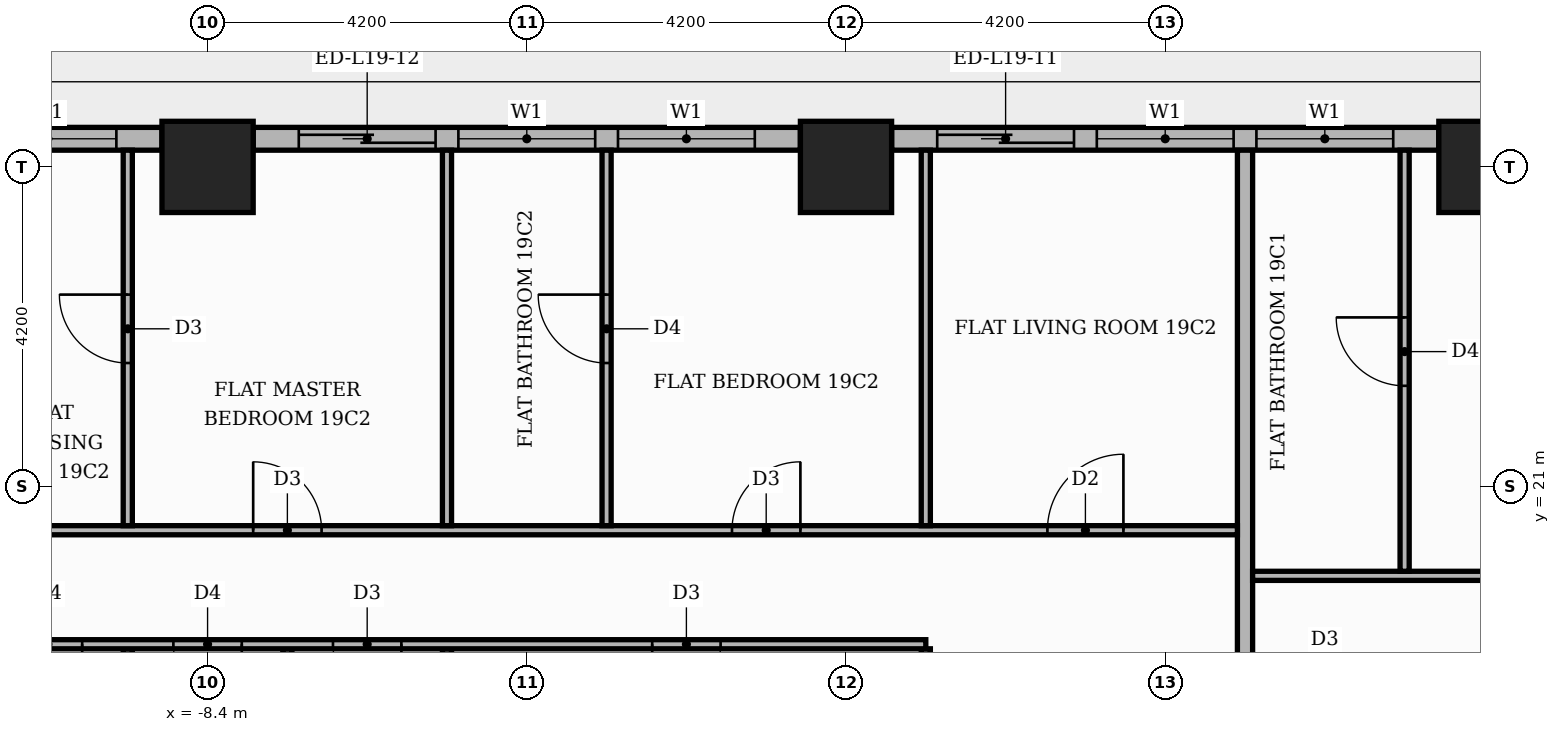
"""IFC4 building model, lengths in metres.
Left out: names, types, materials, properties, quantities, classifications, styles, units other than length and angle.
Written with IfcOpenShell. Run it as: python <this file> out.ifc"""

import sys

from ifc_helpers import new_model, si_unit, direction, frame, frame_2d, origin, origin_2d, place, context, subcontext, project, spatial, rectangle, extrude, element, fill, save


model = new_model("IFC4")
c1 = context("Model", 3, precision=1e-05, world=origin(), true_north=direction((0.0, 1.0)))
c2 = subcontext(c1, "Body", "Model", "MODEL_VIEW")
j1 = project(units=[si_unit("LENGTHUNIT", "METRE"), si_unit("PLANEANGLEUNIT", "RADIAN")], contexts=[c1])
p1 = place(None, origin())
s1 = spatial("IfcSite", under=j1, at=p1, CompositionType="ELEMENT")
p2 = place(p1, origin())
s2 = spatial("IfcBuilding", under=s1, at=p2, CompositionType="ELEMENT")
p3 = place(p2, frame((0.0, 0.0, 83.1)))
s3 = spatial("IfcBuildingStorey", under=s2, at=p3, CompositionType="ELEMENT", Elevation=83.1)
for number, where, z_axis, x_axis in (
    (1, (0.0, 25.2, 0.0), (0.0, 0.0, 1.0), (1.0, 0.0, 0.0)),
    (2, (-8.4, 25.2, 0.0), (0.0, 0.0, 1.0), (1.0, 0.0, 0.0)),
    (3, (8.4, 25.2, 0.0), (0.0, 0.0, 1.0), (1.0, 0.0, 0.0)),
):
    element("IfcColumn", number, at=place(p3, frame(where, z_axis=z_axis, x_axis=x_axis)), inside=s3, PredefinedType="COLUMN", context=c2, shape_type="SweptSolid", body=[
        extrude(rectangle(XDim=1.2, YDim=1.2, at=origin_2d()), origin(), (0.0, 0.0, 1.0), 3.9),
    ])
p4 = place(p3, frame((7.8, 25.57, 0.0), z_axis=(0.0, 0.0, 1.0), x_axis=(-1.0, 0.0, 0.0)))
e4 = element("IfcWall", 4, at=p4, inside=s3, PredefinedType="STANDARD", context=c2, shape_type="SweptSolid", body=[
    extrude(rectangle(XDim=7.2, YDim=0.3, at=frame_2d((3.6, 0.0))), origin(), (0.0, 0.0, 1.0), 3.48),
])
p5 = place(p4, frame((0.6, 0.0, 0.9)))
e5 = element("IfcOpeningElement", 5, at=p5, cuts=e4, PredefinedType="OPENING", context=c2, shape_type="SweptSolid", body=[
    extrude(rectangle(XDim=1.8, YDim=2.1, at=frame_2d((0.9, 1.05))), frame((0.0, 0.16, 0.0), z_axis=(0.0, -1.0, 0.0), x_axis=(1.0, 0.0, 0.0)), (0.0, 0.0, 1.0), 0.32),
])
p6 = place(p4, frame((2.7, 0.0, 0.9)))
e6 = element("IfcOpeningElement", 6, at=p6, cuts=e4, PredefinedType="OPENING", context=c2, shape_type="SweptSolid", body=[
    extrude(rectangle(XDim=1.8, YDim=2.1, at=frame_2d((0.9, 1.05))), frame((0.0, 0.16, 0.0), z_axis=(0.0, -1.0, 0.0), x_axis=(1.0, 0.0, 0.0)), (0.0, 0.0, 1.0), 0.32),
])
p7 = place(p4, frame((4.8, 0.0, 0.0)))
e7 = element("IfcOpeningElement", 7, at=p7, cuts=e4, PredefinedType="OPENING", context=c2, shape_type="SweptSolid", body=[
    extrude(rectangle(XDim=1.8, YDim=2.4, at=frame_2d((0.9, 1.2))), frame((0.0, 0.16, 0.0), z_axis=(0.0, -1.0, 0.0), x_axis=(1.0, 0.0, 0.0)), (0.0, 0.0, 1.0), 0.32),
])
p8 = place(p3, frame((-0.6, 25.57, 0.0), z_axis=(0.0, 0.0, 1.0), x_axis=(-1.0, 0.0, 0.0)))
e8 = element("IfcWall", 8, at=p8, inside=s3, PredefinedType="STANDARD", context=c2, shape_type="SweptSolid", body=[
    extrude(rectangle(XDim=7.2, YDim=0.3, at=frame_2d((3.6, 0.0))), origin(), (0.0, 0.0, 1.0), 3.48),
])
p9 = place(p8, frame((0.6, 0.0, 0.9)))
e9 = element("IfcOpeningElement", 9, at=p9, cuts=e8, PredefinedType="OPENING", context=c2, shape_type="SweptSolid", body=[
    extrude(rectangle(XDim=1.8, YDim=2.1, at=frame_2d((0.9, 1.05))), frame((0.0, 0.16, 0.0), z_axis=(0.0, -1.0, 0.0), x_axis=(1.0, 0.0, 0.0)), (0.0, 0.0, 1.0), 0.32),
])
p10 = place(p8, frame((2.7, 0.0, 0.9)))
e10 = element("IfcOpeningElement", 10, at=p10, cuts=e8, PredefinedType="OPENING", context=c2, shape_type="SweptSolid", body=[
    extrude(rectangle(XDim=1.8, YDim=2.1, at=frame_2d((0.9, 1.05))), frame((0.0, 0.16, 0.0), z_axis=(0.0, -1.0, 0.0), x_axis=(1.0, 0.0, 0.0)), (0.0, 0.0, 1.0), 0.32),
])
p11 = place(p8, frame((4.8, 0.0, 0.0)))
e11 = element("IfcOpeningElement", 11, at=p11, cuts=e8, PredefinedType="OPENING", context=c2, shape_type="SweptSolid", body=[
    extrude(rectangle(XDim=1.8, YDim=2.4, at=frame_2d((0.9, 1.2))), frame((0.0, 0.16, 0.0), z_axis=(0.0, -1.0, 0.0), x_axis=(1.0, 0.0, 0.0)), (0.0, 0.0, 1.0), 0.32),
])
p12 = place(p3, frame((-9.0, 25.57, 0.0), z_axis=(0.0, 0.0, 1.0), x_axis=(-1.0, 0.0, 0.0)))
e12 = element("IfcWall", 12, at=p12, inside=s3, PredefinedType="STANDARD", context=c2, shape_type="SweptSolid", body=[
    extrude(rectangle(XDim=7.2, YDim=0.3, at=frame_2d((3.6, 0.0))), origin(), (0.0, 0.0, 1.0), 3.48),
])
p13 = place(p12, frame((0.6, 0.0, 0.9)))
e13 = element("IfcOpeningElement", 13, at=p13, cuts=e12, PredefinedType="OPENING", context=c2, shape_type="SweptSolid", body=[
    extrude(rectangle(XDim=1.8, YDim=2.1, at=frame_2d((0.9, 1.05))), frame((0.0, 0.16, 0.0), z_axis=(0.0, -1.0, 0.0), x_axis=(1.0, 0.0, 0.0)), (0.0, 0.0, 1.0), 0.32),
])
p14 = place(p12, frame((2.7, 0.0, 0.9)))
e14 = element("IfcOpeningElement", 14, at=p14, cuts=e12, PredefinedType="OPENING", context=c2, shape_type="SweptSolid", body=[
    extrude(rectangle(XDim=1.8, YDim=2.1, at=frame_2d((0.9, 1.05))), frame((0.0, 0.16, 0.0), z_axis=(0.0, -1.0, 0.0), x_axis=(1.0, 0.0, 0.0)), (0.0, 0.0, 1.0), 0.32),
])
p15 = place(p12, frame((4.8, 0.0, 0.9)))
e15 = element("IfcOpeningElement", 15, at=p15, cuts=e12, PredefinedType="OPENING", context=c2, shape_type="SweptSolid", body=[
    extrude(rectangle(XDim=1.8, YDim=2.1, at=frame_2d((0.9, 1.05))), frame((0.0, 0.16, 0.0), z_axis=(0.0, -1.0, 0.0), x_axis=(1.0, 0.0, 0.0)), (0.0, 0.0, 1.0), 0.32),
])
for number, where, z_axis, x_axis in (
    (16, (-9.45, 13.75, 0.0), (0.0, 0.0, 1.0), (0.0, 1.0, 0.0)),
    (17, (-7.35, 13.75, 0.0), (0.0, 0.0, 1.0), (0.0, 1.0, 0.0)),
    (18, (-5.25, 13.75, 0.0), (0.0, 0.0, 1.0), (0.0, 1.0, 0.0)),
    (19, (1.05, 13.75, 0.0), (0.0, 0.0, 1.0), (0.0, 1.0, 0.0)),
):
    element("IfcWall", number, at=place(p3, frame(where, z_axis=z_axis, x_axis=x_axis)), inside=s3, PredefinedType="PARTITIONING", context=c2, shape_type="SweptSolid", body=[
        extrude(rectangle(XDim=5.11, YDim=0.12, at=frame_2d((2.555, 0.0))), origin(), (0.0, 0.0, 1.0), 3.48),
    ])
p16 = place(p3, frame((5.25, 13.75, 0.0), z_axis=(0.0, 0.0, 1.0), x_axis=(0.0, 1.0, 0.0)))
e20 = element("IfcWall", 20, at=p16, inside=s3, PredefinedType="PARTITIONING", context=c2, shape_type="SweptSolid", body=[
    extrude(rectangle(XDim=11.67, YDim=0.2, at=frame_2d((5.835, 0.0))), origin(), (0.0, 0.0, 1.0), 3.48),
])
p17 = place(p3, frame((-13.55, 18.92, 0.0), z_axis=(0.0, 0.0, 1.0), x_axis=(1.0, 0.0, 0.0)))
e21 = element("IfcWall", 21, at=p17, inside=s3, PredefinedType="PARTITIONING", context=c2, shape_type="SweptSolid", body=[
    extrude(rectangle(XDim=14.6, YDim=0.12, at=frame_2d((7.3, 0.0))), origin(), (0.0, 0.0, 1.0), 3.48),
])
p18 = place(p17, frame((11.0, 0.0, 0.0)))
e22 = element("IfcOpeningElement", 22, at=p18, cuts=e21, PredefinedType="OPENING", context=c2, shape_type="SweptSolid", body=[
    extrude(rectangle(XDim=0.9, YDim=2.1, at=frame_2d((0.45, 1.05))), frame((0.0, 0.07, 0.0), z_axis=(0.0, -1.0, 0.0), x_axis=(1.0, 0.0, 0.0)), (0.0, 0.0, 1.0), 0.14),
])
p19 = place(p17, frame((6.8, 0.0, 0.0)))
e23 = element("IfcOpeningElement", 23, at=p19, cuts=e21, PredefinedType="OPENING", context=c2, shape_type="SweptSolid", body=[
    extrude(rectangle(XDim=0.9, YDim=2.1, at=frame_2d((0.45, 1.05))), frame((0.0, 0.07, 0.0), z_axis=(0.0, -1.0, 0.0), x_axis=(1.0, 0.0, 0.0)), (0.0, 0.0, 1.0), 0.14),
])
p20 = place(p17, frame((4.7, 0.0, 0.0)))
e24 = element("IfcOpeningElement", 24, at=p20, cuts=e21, PredefinedType="OPENING", context=c2, shape_type="SweptSolid", body=[
    extrude(rectangle(XDim=0.9, YDim=2.1, at=frame_2d((0.45, 1.05))), frame((0.0, 0.07, 0.0), z_axis=(0.0, -1.0, 0.0), x_axis=(1.0, 0.0, 0.0)), (0.0, 0.0, 1.0), 0.14),
])
p21 = place(p17, frame((2.6, 0.0, 0.0)))
e25 = element("IfcOpeningElement", 25, at=p21, cuts=e21, PredefinedType="OPENING", context=c2, shape_type="SweptSolid", body=[
    extrude(rectangle(XDim=0.9, YDim=2.1, at=frame_2d((0.45, 1.05))), frame((0.0, 0.07, 0.0), z_axis=(0.0, -1.0, 0.0), x_axis=(1.0, 0.0, 0.0)), (0.0, 0.0, 1.0), 0.14),
])
p22 = place(p17, frame((0.5, 0.0, 0.0)))
e26 = element("IfcOpeningElement", 26, at=p22, cuts=e21, PredefinedType="OPENING", context=c2, shape_type="SweptSolid", body=[
    extrude(rectangle(XDim=0.9, YDim=2.1, at=frame_2d((0.45, 1.05))), frame((0.0, 0.07, 0.0), z_axis=(0.0, -1.0, 0.0), x_axis=(1.0, 0.0, 0.0)), (0.0, 0.0, 1.0), 0.14),
])
p23 = place(p3, frame((5.35, 19.82, 0.0), z_axis=(0.0, 0.0, 1.0), x_axis=(1.0, 0.0, 0.0)))
e27 = element("IfcWall", 27, at=p23, inside=s3, PredefinedType="PARTITIONING", context=c2, shape_type="SweptSolid", body=[
    extrude(rectangle(XDim=12.05, YDim=0.12, at=frame_2d((6.025, 0.0))), origin(), (0.0, 0.0, 1.0), 3.48),
])
p24 = place(p23, frame((8.85, 0.0, 0.0)))
e28 = element("IfcOpeningElement", 28, at=p24, cuts=e27, PredefinedType="OPENING", context=c2, shape_type="SweptSolid", body=[
    extrude(rectangle(XDim=1.0, YDim=2.1, at=frame_2d((0.5, 1.05))), frame((0.0, 0.07, 0.0), z_axis=(0.0, -1.0, 0.0), x_axis=(1.0, 0.0, 0.0)), (0.0, 0.0, 1.0), 0.14),
])
p25 = place(p23, frame((5.75, 0.0, 0.0)))
e29 = element("IfcOpeningElement", 29, at=p25, cuts=e27, PredefinedType="OPENING", context=c2, shape_type="SweptSolid", body=[
    extrude(rectangle(XDim=0.9, YDim=2.1, at=frame_2d((0.45, 1.05))), frame((0.0, 0.07, 0.0), z_axis=(0.0, -1.0, 0.0), x_axis=(1.0, 0.0, 0.0)), (0.0, 0.0, 1.0), 0.14),
])
p26 = place(p3, frame((7.35, 19.88, 0.0), z_axis=(0.0, 0.0, 1.0), x_axis=(0.0, 1.0, 0.0)))
e30 = element("IfcWall", 30, at=p26, inside=s3, PredefinedType="PARTITIONING", context=c2, shape_type="SweptSolid", body=[
    extrude(rectangle(XDim=5.54, YDim=0.12, at=frame_2d((2.77, 0.0))), origin(), (0.0, 0.0, 1.0), 3.48),
])
p27 = place(p26, frame((2.44, 0.0, 0.0)))
e31 = element("IfcOpeningElement", 31, at=p27, cuts=e30, PredefinedType="OPENING", context=c2, shape_type="SweptSolid", body=[
    extrude(rectangle(XDim=0.9, YDim=2.1, at=frame_2d((0.45, 1.05))), frame((0.0, 0.07, 0.0), z_axis=(0.0, -1.0, 0.0), x_axis=(1.0, 0.0, 0.0)), (0.0, 0.0, 1.0), 0.14),
])
p28 = place(p3, frame((-13.55, 20.42, 0.0), z_axis=(0.0, 0.0, 1.0), x_axis=(1.0, 0.0, 0.0)))
e32 = element("IfcWall", 32, at=p28, inside=s3, PredefinedType="PARTITIONING", context=c2, shape_type="SweptSolid", body=[
    extrude(rectangle(XDim=18.7, YDim=0.12, at=frame_2d((9.35, 0.0))), origin(), (0.0, 0.0, 1.0), 3.48),
])
p29 = place(p28, frame((16.2, 0.0, 0.0)))
e33 = element("IfcOpeningElement", 33, at=p29, cuts=e32, PredefinedType="OPENING", context=c2, shape_type="SweptSolid", body=[
    extrude(rectangle(XDim=1.0, YDim=2.1, at=frame_2d((0.5, 1.05))), frame((0.0, 0.07, 0.0), z_axis=(0.0, -1.0, 0.0), x_axis=(1.0, 0.0, 0.0)), (0.0, 0.0, 1.0), 0.14),
])
p30 = place(p28, frame((12.05, 0.0, 0.0)))
e34 = element("IfcOpeningElement", 34, at=p30, cuts=e32, PredefinedType="OPENING", context=c2, shape_type="SweptSolid", body=[
    extrude(rectangle(XDim=0.9, YDim=2.1, at=frame_2d((0.45, 1.05))), frame((0.0, 0.07, 0.0), z_axis=(0.0, -1.0, 0.0), x_axis=(1.0, 0.0, 0.0)), (0.0, 0.0, 1.0), 0.14),
])
p31 = place(p28, frame((5.75, 0.0, 0.0)))
e35 = element("IfcOpeningElement", 35, at=p31, cuts=e32, PredefinedType="OPENING", context=c2, shape_type="SweptSolid", body=[
    extrude(rectangle(XDim=0.9, YDim=2.1, at=frame_2d((0.45, 1.05))), frame((0.0, 0.07, 0.0), z_axis=(0.0, -1.0, 0.0), x_axis=(1.0, 0.0, 0.0)), (0.0, 0.0, 1.0), 0.14),
])
p32 = place(p3, frame((-9.45, 20.48, 0.0), z_axis=(0.0, 0.0, 1.0), x_axis=(0.0, 1.0, 0.0)))
e36 = element("IfcWall", 36, at=p32, inside=s3, PredefinedType="PARTITIONING", context=c2, shape_type="SweptSolid", body=[
    extrude(rectangle(XDim=4.94, YDim=0.12, at=frame_2d((2.47, 0.0))), origin(), (0.0, 0.0, 1.0), 3.48),
])
p33 = place(p32, frame((2.14, 0.0, 0.0)))
e37 = element("IfcOpeningElement", 37, at=p33, cuts=e36, PredefinedType="OPENING", context=c2, shape_type="SweptSolid", body=[
    extrude(rectangle(XDim=0.9, YDim=2.1, at=frame_2d((0.45, 1.05))), frame((0.0, 0.07, 0.0), z_axis=(0.0, -1.0, 0.0), x_axis=(1.0, 0.0, 0.0)), (0.0, 0.0, 1.0), 0.14),
])
p34 = place(p3, frame((-5.25, 20.48, 0.0), z_axis=(0.0, 0.0, 1.0), x_axis=(0.0, 1.0, 0.0)))
e38 = element("IfcWall", 38, at=p34, inside=s3, PredefinedType="PARTITIONING", context=c2, shape_type="SweptSolid", body=[
    extrude(rectangle(XDim=4.94, YDim=0.12, at=frame_2d((2.47, 0.0))), origin(), (0.0, 0.0, 1.0), 3.48),
])
p35 = place(p3, frame((-3.15, 20.48, 0.0), z_axis=(0.0, 0.0, 1.0), x_axis=(0.0, 1.0, 0.0)))
e39 = element("IfcWall", 39, at=p35, inside=s3, PredefinedType="PARTITIONING", context=c2, shape_type="SweptSolid", body=[
    extrude(rectangle(XDim=4.94, YDim=0.12, at=frame_2d((2.47, 0.0))), origin(), (0.0, 0.0, 1.0), 3.48),
])
p36 = place(p35, frame((2.14, 0.0, 0.0)))
e40 = element("IfcOpeningElement", 40, at=p36, cuts=e39, PredefinedType="OPENING", context=c2, shape_type="SweptSolid", body=[
    extrude(rectangle(XDim=0.9, YDim=2.1, at=frame_2d((0.45, 1.05))), frame((0.0, 0.07, 0.0), z_axis=(0.0, -1.0, 0.0), x_axis=(1.0, 0.0, 0.0)), (0.0, 0.0, 1.0), 0.14),
])
p37 = place(p3, frame((1.05, 20.48, 0.0), z_axis=(0.0, 0.0, 1.0), x_axis=(0.0, 1.0, 0.0)))
e41 = element("IfcWall", 41, at=p37, inside=s3, PredefinedType="PARTITIONING", context=c2, shape_type="SweptSolid", body=[
    extrude(rectangle(XDim=4.94, YDim=0.12, at=frame_2d((2.47, 0.0))), origin(), (0.0, 0.0, 1.0), 3.48),
])
p38 = place(p5, origin())
e42 = element("IfcWindow", 42, at=p38, inside=s3, PartitioningType="SINGLE_PANEL", PredefinedType="WINDOW", context=c2, shape_type="SweptSolid", body=[
    extrude(rectangle(XDim=1.8, YDim=2.1, at=frame_2d((0.9, 1.05))), frame((0.0, 0.03, 0.0), z_axis=(0.0, -1.0, 0.0), x_axis=(1.0, 0.0, 0.0)), (0.0, 0.0, 1.0), 0.06),
])
fill(e5, e42)
p39 = place(p6, origin())
e43 = element("IfcWindow", 43, at=p39, inside=s3, PartitioningType="SINGLE_PANEL", PredefinedType="WINDOW", context=c2, shape_type="SweptSolid", body=[
    extrude(rectangle(XDim=1.8, YDim=2.1, at=frame_2d((0.9, 1.05))), frame((0.0, 0.03, 0.0), z_axis=(0.0, -1.0, 0.0), x_axis=(1.0, 0.0, 0.0)), (0.0, 0.0, 1.0), 0.06),
])
fill(e6, e43)
p40 = place(p7, origin())
e44 = element("IfcDoor", 44, at=p40, inside=s3, OperationType="SLIDING_TO_RIGHT", PredefinedType="DOOR", context=c2, shape_type="SweptSolid", body=[
    extrude(rectangle(XDim=1.8, YDim=2.4, at=frame_2d((0.9, 1.2))), frame((0.0, 0.025, 0.0), z_axis=(0.0, -1.0, 0.0), x_axis=(1.0, 0.0, 0.0)), (0.0, 0.0, 1.0), 0.05),
])
fill(e7, e44)
p41 = place(p9, origin())
e45 = element("IfcWindow", 45, at=p41, inside=s3, PartitioningType="SINGLE_PANEL", PredefinedType="WINDOW", context=c2, shape_type="SweptSolid", body=[
    extrude(rectangle(XDim=1.8, YDim=2.1, at=frame_2d((0.9, 1.05))), frame((0.0, 0.03, 0.0), z_axis=(0.0, -1.0, 0.0), x_axis=(1.0, 0.0, 0.0)), (0.0, 0.0, 1.0), 0.06),
])
fill(e9, e45)
p42 = place(p10, origin())
e46 = element("IfcWindow", 46, at=p42, inside=s3, PartitioningType="SINGLE_PANEL", PredefinedType="WINDOW", context=c2, shape_type="SweptSolid", body=[
    extrude(rectangle(XDim=1.8, YDim=2.1, at=frame_2d((0.9, 1.05))), frame((0.0, 0.03, 0.0), z_axis=(0.0, -1.0, 0.0), x_axis=(1.0, 0.0, 0.0)), (0.0, 0.0, 1.0), 0.06),
])
fill(e10, e46)
p43 = place(p11, origin())
e47 = element("IfcDoor", 47, at=p43, inside=s3, OperationType="SLIDING_TO_RIGHT", PredefinedType="DOOR", context=c2, shape_type="SweptSolid", body=[
    extrude(rectangle(XDim=1.8, YDim=2.4, at=frame_2d((0.9, 1.2))), frame((0.0, 0.025, 0.0), z_axis=(0.0, -1.0, 0.0), x_axis=(1.0, 0.0, 0.0)), (0.0, 0.0, 1.0), 0.05),
])
fill(e11, e47)
p44 = place(p13, origin())
e48 = element("IfcWindow", 48, at=p44, inside=s3, PartitioningType="SINGLE_PANEL", PredefinedType="WINDOW", context=c2, shape_type="SweptSolid", body=[
    extrude(rectangle(XDim=1.8, YDim=2.1, at=frame_2d((0.9, 1.05))), frame((0.0, 0.03, 0.0), z_axis=(0.0, -1.0, 0.0), x_axis=(1.0, 0.0, 0.0)), (0.0, 0.0, 1.0), 0.06),
])
fill(e13, e48)
p45 = place(p27, origin())
e49 = element("IfcDoor", 49, at=p45, inside=s3, OperationType="SINGLE_SWING_RIGHT", PredefinedType="DOOR", context=c2, shape_type="SweptSolid", body=[
    extrude(rectangle(XDim=0.9, YDim=2.1, at=frame_2d((0.45, 1.05))), frame((0.0, 0.025, 0.0), z_axis=(0.0, -1.0, 0.0), x_axis=(1.0, 0.0, 0.0)), (0.0, 0.0, 1.0), 0.05),
])
fill(e31, e49)
p46 = place(p18, frame((0.9, 0.0, 0.0), z_axis=(0.0, 0.0, 1.0), x_axis=(-1.0, 0.0, 0.0)))
e50 = element("IfcDoor", 50, at=p46, inside=s3, OperationType="SINGLE_SWING_LEFT", PredefinedType="DOOR", context=c2, shape_type="SweptSolid", body=[
    extrude(rectangle(XDim=0.9, YDim=2.1, at=frame_2d((0.45, 1.05))), frame((0.0, 0.025, 0.0), z_axis=(0.0, -1.0, 0.0), x_axis=(1.0, 0.0, 0.0)), (0.0, 0.0, 1.0), 0.05),
])
fill(e22, e50)
p47 = place(p19, frame((0.9, 0.0, 0.0), z_axis=(0.0, 0.0, 1.0), x_axis=(-1.0, 0.0, 0.0)))
e51 = element("IfcDoor", 51, at=p47, inside=s3, OperationType="SINGLE_SWING_RIGHT", PredefinedType="DOOR", context=c2, shape_type="SweptSolid", body=[
    extrude(rectangle(XDim=0.9, YDim=2.1, at=frame_2d((0.45, 1.05))), frame((0.0, 0.025, 0.0), z_axis=(0.0, -1.0, 0.0), x_axis=(1.0, 0.0, 0.0)), (0.0, 0.0, 1.0), 0.05),
])
fill(e23, e51)
p48 = place(p20, frame((0.9, 0.0, 0.0), z_axis=(0.0, 0.0, 1.0), x_axis=(-1.0, 0.0, 0.0)))
e52 = element("IfcDoor", 52, at=p48, inside=s3, OperationType="SINGLE_SWING_RIGHT", PredefinedType="DOOR", context=c2, shape_type="SweptSolid", body=[
    extrude(rectangle(XDim=0.9, YDim=2.1, at=frame_2d((0.45, 1.05))), frame((0.0, 0.025, 0.0), z_axis=(0.0, -1.0, 0.0), x_axis=(1.0, 0.0, 0.0)), (0.0, 0.0, 1.0), 0.05),
])
fill(e24, e52)
p49 = place(p21, frame((0.9, 0.0, 0.0), z_axis=(0.0, 0.0, 1.0), x_axis=(-1.0, 0.0, 0.0)))
e53 = element("IfcDoor", 53, at=p49, inside=s3, OperationType="SINGLE_SWING_RIGHT", PredefinedType="DOOR", context=c2, shape_type="SweptSolid", body=[
    extrude(rectangle(XDim=0.9, YDim=2.1, at=frame_2d((0.45, 1.05))), frame((0.0, 0.025, 0.0), z_axis=(0.0, -1.0, 0.0), x_axis=(1.0, 0.0, 0.0)), (0.0, 0.0, 1.0), 0.05),
])
fill(e25, e53)
p50 = place(p29, origin())
e54 = element("IfcDoor", 54, at=p50, inside=s3, OperationType="SINGLE_SWING_RIGHT", PredefinedType="DOOR", context=c2, shape_type="SweptSolid", body=[
    extrude(rectangle(XDim=1.0, YDim=2.1, at=frame_2d((0.5, 1.05))), frame((0.0, 0.025, 0.0), z_axis=(0.0, -1.0, 0.0), x_axis=(1.0, 0.0, 0.0)), (0.0, 0.0, 1.0), 0.05),
])
fill(e33, e54)
p51 = place(p30, origin())
e55 = element("IfcDoor", 55, at=p51, inside=s3, OperationType="SINGLE_SWING_RIGHT", PredefinedType="DOOR", context=c2, shape_type="SweptSolid", body=[
    extrude(rectangle(XDim=0.9, YDim=2.1, at=frame_2d((0.45, 1.05))), frame((0.0, 0.025, 0.0), z_axis=(0.0, -1.0, 0.0), x_axis=(1.0, 0.0, 0.0)), (0.0, 0.0, 1.0), 0.05),
])
fill(e34, e55)
p52 = place(p36, origin())
e56 = element("IfcDoor", 56, at=p52, inside=s3, OperationType="SINGLE_SWING_RIGHT", PredefinedType="DOOR", context=c2, shape_type="SweptSolid", body=[
    extrude(rectangle(XDim=0.9, YDim=2.1, at=frame_2d((0.45, 1.05))), frame((0.0, 0.025, 0.0), z_axis=(0.0, -1.0, 0.0), x_axis=(1.0, 0.0, 0.0)), (0.0, 0.0, 1.0), 0.05),
])
fill(e40, e56)
p53 = place(p31, origin())
e57 = element("IfcDoor", 57, at=p53, inside=s3, OperationType="SINGLE_SWING_LEFT", PredefinedType="DOOR", context=c2, shape_type="SweptSolid", body=[
    extrude(rectangle(XDim=0.9, YDim=2.1, at=frame_2d((0.45, 1.05))), frame((0.0, 0.025, 0.0), z_axis=(0.0, -1.0, 0.0), x_axis=(1.0, 0.0, 0.0)), (0.0, 0.0, 1.0), 0.05),
])
fill(e35, e57)
p54 = place(p33, origin())
e58 = element("IfcDoor", 58, at=p54, inside=s3, OperationType="SINGLE_SWING_RIGHT", PredefinedType="DOOR", context=c2, shape_type="SweptSolid", body=[
    extrude(rectangle(XDim=0.9, YDim=2.1, at=frame_2d((0.45, 1.05))), frame((0.0, 0.025, 0.0), z_axis=(0.0, -1.0, 0.0), x_axis=(1.0, 0.0, 0.0)), (0.0, 0.0, 1.0), 0.05),
])
fill(e37, e58)
save(model, sys.argv[1])
